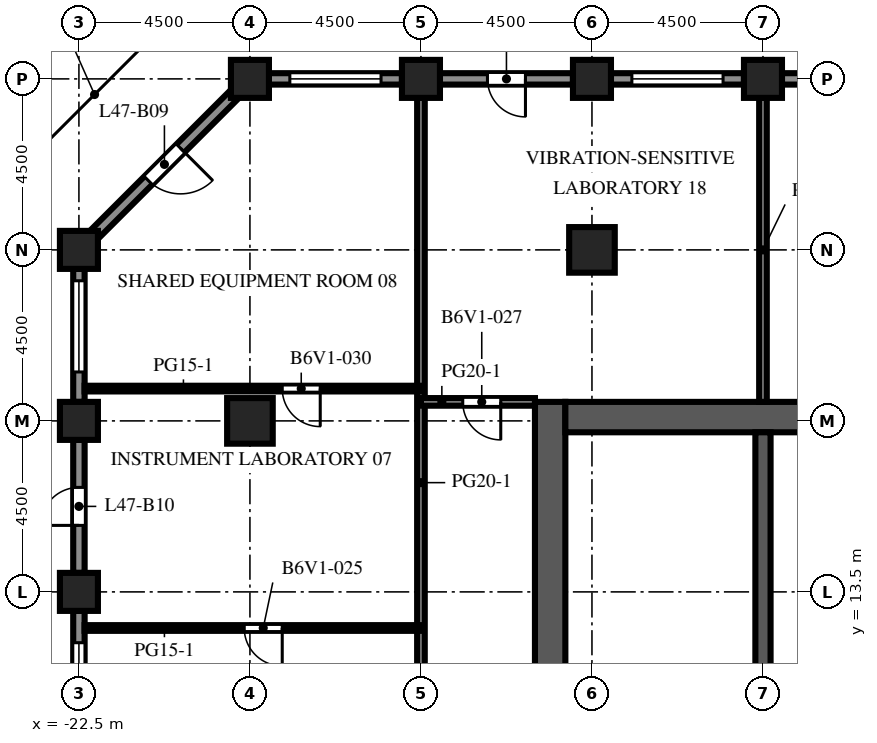
"""IFC4 building model, lengths in metres.
Left out: names, types, materials, properties, quantities, classifications, styles, units other than length and angle.
Written with IfcOpenShell. Run it as: python <this file> out.ifc"""

import sys

from ifc_helpers import new_model, si_unit, direction, frame, frame_2d, origin, origin_2d, place, context, subcontext, project, spatial, rectangle, extrude, element, fill, save


model = new_model("IFC4")
c1 = context("Model", 3, precision=1e-05, world=origin(), true_north=direction((0.0, 1.0)))
c2 = subcontext(c1, "Body", "Model", "MODEL_VIEW")
j1 = project(units=[si_unit("LENGTHUNIT", "METRE"), si_unit("PLANEANGLEUNIT", "RADIAN")], contexts=[c1])
p1 = place(None, origin())
s1 = spatial("IfcSite", under=j1, at=p1, CompositionType="ELEMENT")
p2 = place(p1, origin())
s2 = spatial("IfcBuilding", under=s1, at=p2, CompositionType="ELEMENT")
p3 = place(p2, frame((0.0, 0.0, 207.9)))
s3 = spatial("IfcBuildingStorey", under=s2, at=p3, CompositionType="ELEMENT", Elevation=207.9)
for number, where, z_axis, x_axis in (
    (1, (-22.5, 13.5, 0.0), (0.0, 0.0, 1.0), (1.0, 0.0, 0.0)),
    (2, (-22.5, 18.0, 0.0), (0.0, 0.0, 1.0), (1.0, 0.0, 0.0)),
    (3, (-22.5, 22.5, 0.0), (0.0, 0.0, 1.0), (1.0, 0.0, 0.0)),
    (4, (-18.0, 27.0, 0.0), (0.0, 0.0, 1.0), (1.0, 0.0, 0.0)),
    (5, (-13.5, 27.0, 0.0), (0.0, 0.0, 1.0), (1.0, 0.0, 0.0)),
    (6, (-9.0, 27.0, 0.0), (0.0, 0.0, 1.0), (1.0, 0.0, 0.0)),
    (7, (-4.5, 27.0, 0.0), (0.0, 0.0, 1.0), (1.0, 0.0, 0.0)),
):
    element("IfcColumn", number, at=place(p3, frame(where, z_axis=z_axis, x_axis=x_axis)), inside=s3, PredefinedType="COLUMN", context=c2, shape_type="SweptSolid", body=[
        extrude(rectangle(XDim=1.0, YDim=1.0, at=origin_2d()), origin(), (0.0, 0.0, 1.0), 4.1),
    ])
for number, where, z_axis, x_axis in (
    (8, (-18.0, 18.0, 0.0), (0.0, 0.0, 1.0), (1.0, 0.0, 0.0)),
    (9, (-9.0, 22.5, 0.0), (0.0, 0.0, 1.0), (1.0, 0.0, 0.0)),
):
    element("IfcColumn", number, at=place(p3, frame(where, z_axis=z_axis, x_axis=x_axis)), inside=s3, PredefinedType="COLUMN", context=c2, shape_type="SweptSolid", body=[
        extrude(rectangle(XDim=1.2, YDim=1.2, at=origin_2d()), origin(), (0.0, 0.0, 1.0), 4.1),
    ])
p4 = place(p3, frame((-10.1, -9.0, 0.0), z_axis=(0.0, 0.0, 1.0), x_axis=(0.0, 1.0, 0.0)))
e10 = element("IfcWall", 10, at=p4, inside=s3, PredefinedType="SHEAR", context=c2, shape_type="SweptSolid", body=[
    extrude(rectangle(XDim=27.5, YDim=0.8, at=frame_2d((13.75, 0.0))), origin(), (0.0, 0.0, 1.0), 4.1),
])
p5 = place(p4, frame((12.55, 0.0, 0.0)))
e11 = element("IfcOpeningElement", 11, at=p5, cuts=e10, PredefinedType="OPENING", context=c2, shape_type="SweptSolid", body=[
    extrude(rectangle(XDim=2.4, YDim=2.4, at=frame_2d((1.2, 1.2))), frame((0.0, 0.41, 0.0), z_axis=(0.0, -1.0, 0.0), x_axis=(1.0, 0.0, 0.0)), (0.0, 0.0, 1.0), 0.82),
])
p6 = place(p4, frame((6.825, 0.0, 0.0)))
e12 = element("IfcOpeningElement", 12, at=p6, cuts=e10, PredefinedType="OPENING", context=c2, shape_type="SweptSolid", body=[
    extrude(rectangle(XDim=1.2, YDim=2.1, at=frame_2d((0.6, 1.05))), frame((0.0, 0.41, 0.0), z_axis=(0.0, -1.0, 0.0), x_axis=(1.0, 0.0, 0.0)), (0.0, 0.0, 1.0), 0.82),
])
p7 = place(p4, frame((19.475, 0.0, 0.0)))
e13 = element("IfcOpeningElement", 13, at=p7, cuts=e10, PredefinedType="OPENING", context=c2, shape_type="SweptSolid", body=[
    extrude(rectangle(XDim=1.2, YDim=2.1, at=frame_2d((0.6, 1.05))), frame((0.0, 0.41, 0.0), z_axis=(0.0, -1.0, 0.0), x_axis=(1.0, 0.0, 0.0)), (0.0, 0.0, 1.0), 0.82),
])
p8 = place(p3, frame((-9.7, 18.1, 0.0), z_axis=(0.0, 0.0, 1.0), x_axis=(1.0, 0.0, 0.0)))
e14 = element("IfcWall", 14, at=p8, inside=s3, PredefinedType="SHEAR", context=c2, shape_type="SweptSolid", body=[
    extrude(rectangle(XDim=10.4, YDim=0.8, at=frame_2d((5.2, 0.0))), origin(), (0.0, 0.0, 1.0), 4.1),
])
p9 = place(p3, frame((-4.5, 10.2, 0.0), z_axis=(0.0, 0.0, 1.0), x_axis=(0.0, 1.0, 0.0)))
e15 = element("IfcWall", 15, at=p9, inside=s3, PredefinedType="SHEAR", context=c2, shape_type="SweptSolid", body=[
    extrude(rectangle(XDim=7.5, YDim=0.4, at=frame_2d((3.75, 0.0))), origin(), (0.0, 0.0, 1.0), 4.1),
])
p10 = place(p3, frame((-4.0, 27.0, 0.0), z_axis=(0.0, 0.0, 1.0), x_axis=(1.0, 0.0, 0.0)))
e16 = element("IfcWall", 16, at=p10, inside=s3, PredefinedType="SOLIDWALL", context=c2, shape_type="SweptSolid", body=[
    extrude(rectangle(XDim=3.5, YDim=0.3, at=frame_2d((1.75, 0.0))), origin(), (0.0, 0.0, 1.0), 2.85),
])
p11 = place(p10, frame((0.55, 0.0, 0.8)))
e17 = element("IfcOpeningElement", 17, at=p11, cuts=e16, PredefinedType="OPENING", context=c2, shape_type="SweptSolid", body=[
    extrude(rectangle(XDim=2.4, YDim=1.7, at=frame_2d((1.2, 0.85))), frame((0.0, 0.16, 0.0), z_axis=(0.0, -1.0, 0.0), x_axis=(1.0, 0.0, 0.0)), (0.0, 0.0, 1.0), 0.32),
])
p12 = place(p3, frame((-8.5, 27.0, 0.0), z_axis=(0.0, 0.0, 1.0), x_axis=(1.0, 0.0, 0.0)))
e18 = element("IfcWall", 18, at=p12, inside=s3, PredefinedType="SOLIDWALL", context=c2, shape_type="SweptSolid", body=[
    extrude(rectangle(XDim=3.5, YDim=0.3, at=frame_2d((1.75, 0.0))), origin(), (0.0, 0.0, 1.0), 2.85),
])
p13 = place(p12, frame((0.55, 0.0, 0.8)))
e19 = element("IfcOpeningElement", 19, at=p13, cuts=e18, PredefinedType="OPENING", context=c2, shape_type="SweptSolid", body=[
    extrude(rectangle(XDim=2.4, YDim=1.7, at=frame_2d((1.2, 0.85))), frame((0.0, 0.16, 0.0), z_axis=(0.0, -1.0, 0.0), x_axis=(1.0, 0.0, 0.0)), (0.0, 0.0, 1.0), 0.32),
])
p14 = place(p3, frame((-13.0, 27.0, 0.0), z_axis=(0.0, 0.0, 1.0), x_axis=(1.0, 0.0, 0.0)))
e20 = element("IfcWall", 20, at=p14, inside=s3, PredefinedType="SOLIDWALL", context=c2, shape_type="SweptSolid", body=[
    extrude(rectangle(XDim=3.5, YDim=0.3, at=frame_2d((1.75, 0.0))), origin(), (0.0, 0.0, 1.0), 2.85),
])
p15 = place(p14, frame((1.25, 0.0, 0.0)))
e21 = element("IfcOpeningElement", 21, at=p15, cuts=e20, PredefinedType="OPENING", context=c2, shape_type="SweptSolid", body=[
    extrude(rectangle(XDim=1.0, YDim=2.2, at=frame_2d((0.5, 1.1))), frame((0.0, 0.16, 0.0), z_axis=(0.0, -1.0, 0.0), x_axis=(1.0, 0.0, 0.0)), (0.0, 0.0, 1.0), 0.32),
])
p16 = place(p3, frame((-17.5, 27.0, 0.0), z_axis=(0.0, 0.0, 1.0), x_axis=(1.0, 0.0, 0.0)))
e22 = element("IfcWall", 22, at=p16, inside=s3, PredefinedType="SOLIDWALL", context=c2, shape_type="SweptSolid", body=[
    extrude(rectangle(XDim=3.5, YDim=0.3, at=frame_2d((1.75, 0.0))), origin(), (0.0, 0.0, 1.0), 2.85),
])
p17 = place(p16, frame((0.55, 0.0, 0.8)))
e23 = element("IfcOpeningElement", 23, at=p17, cuts=e22, PredefinedType="OPENING", context=c2, shape_type="SweptSolid", body=[
    extrude(rectangle(XDim=2.4, YDim=1.7, at=frame_2d((1.2, 0.85))), frame((0.0, 0.16, 0.0), z_axis=(0.0, -1.0, 0.0), x_axis=(1.0, 0.0, 0.0)), (0.0, 0.0, 1.0), 0.32),
])
p18 = place(p3, frame((-22.106, 22.894, 0.0), z_axis=(0.0, 0.0, 1.0), x_axis=(0.707106781187, 0.707106781187, 0.0)))
e24 = element("IfcWall", 24, at=p18, inside=s3, PredefinedType="SOLIDWALL", context=c2, shape_type="SweptSolid", body=[
    extrude(rectangle(XDim=5.25, YDim=0.3, at=frame_2d((2.625, 0.0))), origin(), (0.0, 0.0, 1.0), 2.85),
])
p19 = place(p18, frame((2.025, 0.0, 0.0)))
e25 = element("IfcOpeningElement", 25, at=p19, cuts=e24, PredefinedType="OPENING", context=c2, shape_type="SweptSolid", body=[
    extrude(rectangle(XDim=1.2, YDim=2.2, at=frame_2d((0.6, 1.1))), frame((0.0, 0.16, 0.0), z_axis=(0.0, -1.0, 0.0), x_axis=(1.0, 0.0, 0.0)), (0.0, 0.0, 1.0), 0.32),
])
p20 = place(p3, frame((-22.5, 18.5, 0.0), z_axis=(0.0, 0.0, 1.0), x_axis=(0.0, 1.0, 0.0)))
e26 = element("IfcWall", 26, at=p20, inside=s3, PredefinedType="SOLIDWALL", context=c2, shape_type="SweptSolid", body=[
    extrude(rectangle(XDim=3.5, YDim=0.3, at=frame_2d((1.75, 0.0))), origin(), (0.0, 0.0, 1.0), 2.85),
])
p21 = place(p20, frame((0.788, 0.0, 0.8)))
e27 = element("IfcOpeningElement", 27, at=p21, cuts=e26, PredefinedType="OPENING", context=c2, shape_type="SweptSolid", body=[
    extrude(rectangle(XDim=2.4, YDim=1.7, at=frame_2d((1.2, 0.85))), frame((0.0, 0.16, 0.0), z_axis=(0.0, -1.0, 0.0), x_axis=(1.0, 0.0, 0.0)), (0.0, 0.0, 1.0), 0.32),
])
p22 = place(p3, frame((-22.5, 14.0, 0.0), z_axis=(0.0, 0.0, 1.0), x_axis=(0.0, 1.0, 0.0)))
e28 = element("IfcWall", 28, at=p22, inside=s3, PredefinedType="SOLIDWALL", context=c2, shape_type="SweptSolid", body=[
    extrude(rectangle(XDim=3.5, YDim=0.3, at=frame_2d((1.75, 0.0))), origin(), (0.0, 0.0, 1.0), 2.85),
])
p23 = place(p22, frame((1.25, 0.0, 0.0)))
e29 = element("IfcOpeningElement", 29, at=p23, cuts=e28, PredefinedType="OPENING", context=c2, shape_type="SweptSolid", body=[
    extrude(rectangle(XDim=1.0, YDim=2.2, at=frame_2d((0.5, 1.1))), frame((0.0, 0.16, 0.0), z_axis=(0.0, -1.0, 0.0), x_axis=(1.0, 0.0, 0.0)), (0.0, 0.0, 1.0), 0.32),
])
p24 = place(p3, frame((-22.5, 9.5, 0.0), z_axis=(0.0, 0.0, 1.0), x_axis=(0.0, 1.0, 0.0)))
e30 = element("IfcWall", 30, at=p24, inside=s3, PredefinedType="SOLIDWALL", context=c2, shape_type="SweptSolid", body=[
    extrude(rectangle(XDim=3.5, YDim=0.3, at=frame_2d((1.75, 0.0))), origin(), (0.0, 0.0, 1.0), 2.85),
])
p25 = place(p24, frame((0.262, 0.0, 0.8)))
e31 = element("IfcOpeningElement", 31, at=p25, cuts=e30, PredefinedType="OPENING", context=c2, shape_type="SweptSolid", body=[
    extrude(rectangle(XDim=2.4, YDim=1.7, at=frame_2d((1.2, 0.85))), frame((0.0, 0.16, 0.0), z_axis=(0.0, -1.0, 0.0), x_axis=(1.0, 0.0, 0.0)), (0.0, 0.0, 1.0), 0.32),
])
for number, where, z_axis, x_axis in (
    (32, (-4.3, 12.45, 0.0), (0.0, 0.0, 1.0), (1.0, 0.0, 0.0)),
    (33, (-4.3, 14.85, 0.0), (0.0, 0.0, 1.0), (1.0, 0.0, 0.0)),
):
    element("IfcWall", number, at=place(p3, frame(where, z_axis=z_axis, x_axis=x_axis)), inside=s3, PredefinedType="PARTITIONING", context=c2, shape_type="SweptSolid", body=[
        extrude(rectangle(XDim=3.6, YDim=0.1, at=frame_2d((1.8, 0.0))), origin(), (0.0, 0.0, 1.0), 3.65),
    ])
p26 = place(p3, frame((-13.5, 6.25, 0.0), z_axis=(0.0, 0.0, 1.0), x_axis=(0.0, 1.0, 0.0)))
e34 = element("IfcWall", 34, at=p26, inside=s3, PredefinedType="PARTITIONING", context=c2, shape_type="SweptSolid", body=[
    extrude(rectangle(XDim=20.25, YDim=0.2, at=frame_2d((10.125, 0.0))), origin(), (0.0, 0.0, 1.0), 3.65),
])
p27 = place(p3, frame((-4.5, 18.5, 0.0), z_axis=(0.0, 0.0, 1.0), x_axis=(0.0, 1.0, 0.0)))
e35 = element("IfcWall", 35, at=p27, inside=s3, PredefinedType="PARTITIONING", context=c2, shape_type="SweptSolid", body=[
    extrude(rectangle(XDim=8.0, YDim=0.2, at=frame_2d((4.0, 0.0))), origin(), (0.0, 0.0, 1.0), 3.65),
])
p28 = place(p3, frame((-22.35, 12.55, 0.0), z_axis=(0.0, 0.0, 1.0), x_axis=(1.0, 0.0, 0.0)))
e36 = element("IfcWall", 36, at=p28, inside=s3, PredefinedType="PARTITIONING", context=c2, shape_type="SweptSolid", body=[
    extrude(rectangle(XDim=8.85, YDim=0.15, at=frame_2d((4.425, 0.0))), origin(), (0.0, 0.0, 1.0), 3.65),
])
p29 = place(p28, frame((4.2, 0.0, 0.0)))
e37 = element("IfcOpeningElement", 37, at=p29, cuts=e36, PredefinedType="OPENING", context=c2, shape_type="SweptSolid", body=[
    extrude(rectangle(XDim=1.0, YDim=2.1, at=frame_2d((0.5, 1.05))), frame((0.0, 0.085, 0.0), z_axis=(0.0, -1.0, 0.0), x_axis=(1.0, 0.0, 0.0)), (0.0, 0.0, 1.0), 0.17),
])
p30 = place(p3, frame((-13.5, 18.5, 0.0), z_axis=(0.0, 0.0, 1.0), x_axis=(1.0, 0.0, 0.0)))
e38 = element("IfcWall", 38, at=p30, inside=s3, PredefinedType="PARTITIONING", context=c2, shape_type="SweptSolid", body=[
    extrude(rectangle(XDim=3.0, YDim=0.2, at=frame_2d((1.5, 0.0))), origin(), (0.0, 0.0, 1.0), 3.65),
])
p31 = place(p30, frame((1.1, 0.0, 0.0)))
e39 = element("IfcOpeningElement", 39, at=p31, cuts=e38, PredefinedType="OPENING", context=c2, shape_type="SweptSolid", body=[
    extrude(rectangle(XDim=1.0, YDim=2.1, at=frame_2d((0.5, 1.05))), frame((0.0, 0.11, 0.0), z_axis=(0.0, -1.0, 0.0), x_axis=(1.0, 0.0, 0.0)), (0.0, 0.0, 1.0), 0.22),
])
p32 = place(p3, frame((-22.35, 18.85, 0.0), z_axis=(0.0, 0.0, 1.0), x_axis=(1.0, 0.0, 0.0)))
e40 = element("IfcWall", 40, at=p32, inside=s3, PredefinedType="PARTITIONING", context=c2, shape_type="SweptSolid", body=[
    extrude(rectangle(XDim=8.85, YDim=0.15, at=frame_2d((4.425, 0.0))), origin(), (0.0, 0.0, 1.0), 3.65),
])
p33 = place(p32, frame((5.2, 0.0, 0.0)))
e41 = element("IfcOpeningElement", 41, at=p33, cuts=e40, PredefinedType="OPENING", context=c2, shape_type="SweptSolid", body=[
    extrude(rectangle(XDim=1.0, YDim=2.1, at=frame_2d((0.5, 1.05))), frame((0.0, 0.085, 0.0), z_axis=(0.0, -1.0, 0.0), x_axis=(1.0, 0.0, 0.0)), (0.0, 0.0, 1.0), 0.17),
])
p34 = place(p13, origin())
e42 = element("IfcWindow", 42, at=p34, inside=s3, PartitioningType="SINGLE_PANEL", PredefinedType="WINDOW", context=c2, shape_type="SweptSolid", body=[
    extrude(rectangle(XDim=2.4, YDim=1.7, at=frame_2d((1.2, 0.85))), frame((0.0, 0.03, 0.0), z_axis=(0.0, -1.0, 0.0), x_axis=(1.0, 0.0, 0.0)), (0.0, 0.0, 1.0), 0.06),
])
fill(e19, e42)
p35 = place(p15, origin())
e43 = element("IfcDoor", 43, at=p35, inside=s3, OperationType="SINGLE_SWING_RIGHT", PredefinedType="DOOR", context=c2, shape_type="SweptSolid", body=[
    extrude(rectangle(XDim=1.0, YDim=2.2, at=frame_2d((0.5, 1.1))), frame((0.0, 0.025, 0.0), z_axis=(0.0, -1.0, 0.0), x_axis=(1.0, 0.0, 0.0)), (0.0, 0.0, 1.0), 0.05),
])
fill(e21, e43)
p36 = place(p17, origin())
e44 = element("IfcWindow", 44, at=p36, inside=s3, PartitioningType="SINGLE_PANEL", PredefinedType="WINDOW", context=c2, shape_type="SweptSolid", body=[
    extrude(rectangle(XDim=2.4, YDim=1.7, at=frame_2d((1.2, 0.85))), frame((0.0, 0.03, 0.0), z_axis=(0.0, -1.0, 0.0), x_axis=(1.0, 0.0, 0.0)), (0.0, 0.0, 1.0), 0.06),
])
fill(e23, e44)
p37 = place(p19, origin())
e45 = element("IfcDoor", 45, at=p37, inside=s3, OperationType="SINGLE_SWING_RIGHT", PredefinedType="DOOR", context=c2, shape_type="SweptSolid", body=[
    extrude(rectangle(XDim=1.2, YDim=2.2, at=frame_2d((0.6, 1.1))), frame((0.0, 0.025, 0.0), z_axis=(0.0, -1.0, 0.0), x_axis=(1.0, 0.0, 0.0)), (0.0, 0.0, 1.0), 0.05),
])
fill(e25, e45)
p38 = place(p21, origin())
e46 = element("IfcWindow", 46, at=p38, inside=s3, PartitioningType="SINGLE_PANEL", PredefinedType="WINDOW", context=c2, shape_type="SweptSolid", body=[
    extrude(rectangle(XDim=2.4, YDim=1.7, at=frame_2d((1.2, 0.85))), frame((0.0, 0.03, 0.0), z_axis=(0.0, -1.0, 0.0), x_axis=(1.0, 0.0, 0.0)), (0.0, 0.0, 1.0), 0.06),
])
fill(e27, e46)
p39 = place(p23, origin())
e47 = element("IfcDoor", 47, at=p39, inside=s3, OperationType="SINGLE_SWING_LEFT", PredefinedType="DOOR", context=c2, shape_type="SweptSolid", body=[
    extrude(rectangle(XDim=1.0, YDim=2.2, at=frame_2d((0.5, 1.1))), frame((0.0, 0.025, 0.0), z_axis=(0.0, -1.0, 0.0), x_axis=(1.0, 0.0, 0.0)), (0.0, 0.0, 1.0), 0.05),
])
fill(e29, e47)
p40 = place(p25, origin())
e48 = element("IfcWindow", 48, at=p40, inside=s3, PartitioningType="SINGLE_PANEL", PredefinedType="WINDOW", context=c2, shape_type="SweptSolid", body=[
    extrude(rectangle(XDim=2.4, YDim=1.7, at=frame_2d((1.2, 0.85))), frame((0.0, 0.03, 0.0), z_axis=(0.0, -1.0, 0.0), x_axis=(1.0, 0.0, 0.0)), (0.0, 0.0, 1.0), 0.06),
])
fill(e31, e48)
p41 = place(p7, origin())
e49 = element("IfcDoor", 49, at=p41, inside=s3, OperationType="SINGLE_SWING_LEFT", PredefinedType="DOOR", context=c2, shape_type="SweptSolid", body=[
    extrude(rectangle(XDim=1.2, YDim=2.1, at=frame_2d((0.6, 1.05))), frame((0.0, 0.025, 0.0), z_axis=(0.0, -1.0, 0.0), x_axis=(1.0, 0.0, 0.0)), (0.0, 0.0, 1.0), 0.05),
])
fill(e13, e49)
p42 = place(p29, origin())
e50 = element("IfcDoor", 50, at=p42, inside=s3, OperationType="SINGLE_SWING_RIGHT", PredefinedType="DOOR", context=c2, shape_type="SweptSolid", body=[
    extrude(rectangle(XDim=1.0, YDim=2.1, at=frame_2d((0.5, 1.05))), frame((0.0, 0.025, 0.0), z_axis=(0.0, -1.0, 0.0), x_axis=(1.0, 0.0, 0.0)), (0.0, 0.0, 1.0), 0.05),
])
fill(e37, e50)
p43 = place(p31, origin())
e51 = element("IfcDoor", 51, at=p43, inside=s3, OperationType="SINGLE_SWING_RIGHT", PredefinedType="DOOR", context=c2, shape_type="SweptSolid", body=[
    extrude(rectangle(XDim=1.0, YDim=2.1, at=frame_2d((0.5, 1.05))), frame((0.0, 0.025, 0.0), z_axis=(0.0, -1.0, 0.0), x_axis=(1.0, 0.0, 0.0)), (0.0, 0.0, 1.0), 0.05),
])
fill(e39, e51)
p44 = place(p33, origin())
e52 = element("IfcDoor", 52, at=p44, inside=s3, OperationType="SINGLE_SWING_RIGHT", PredefinedType="DOOR", context=c2, shape_type="SweptSolid", body=[
    extrude(rectangle(XDim=1.0, YDim=2.1, at=frame_2d((0.5, 1.05))), frame((0.0, 0.025, 0.0), z_axis=(0.0, -1.0, 0.0), x_axis=(1.0, 0.0, 0.0)), (0.0, 0.0, 1.0), 0.05),
])
fill(e41, e52)
save(model, sys.argv[1])
